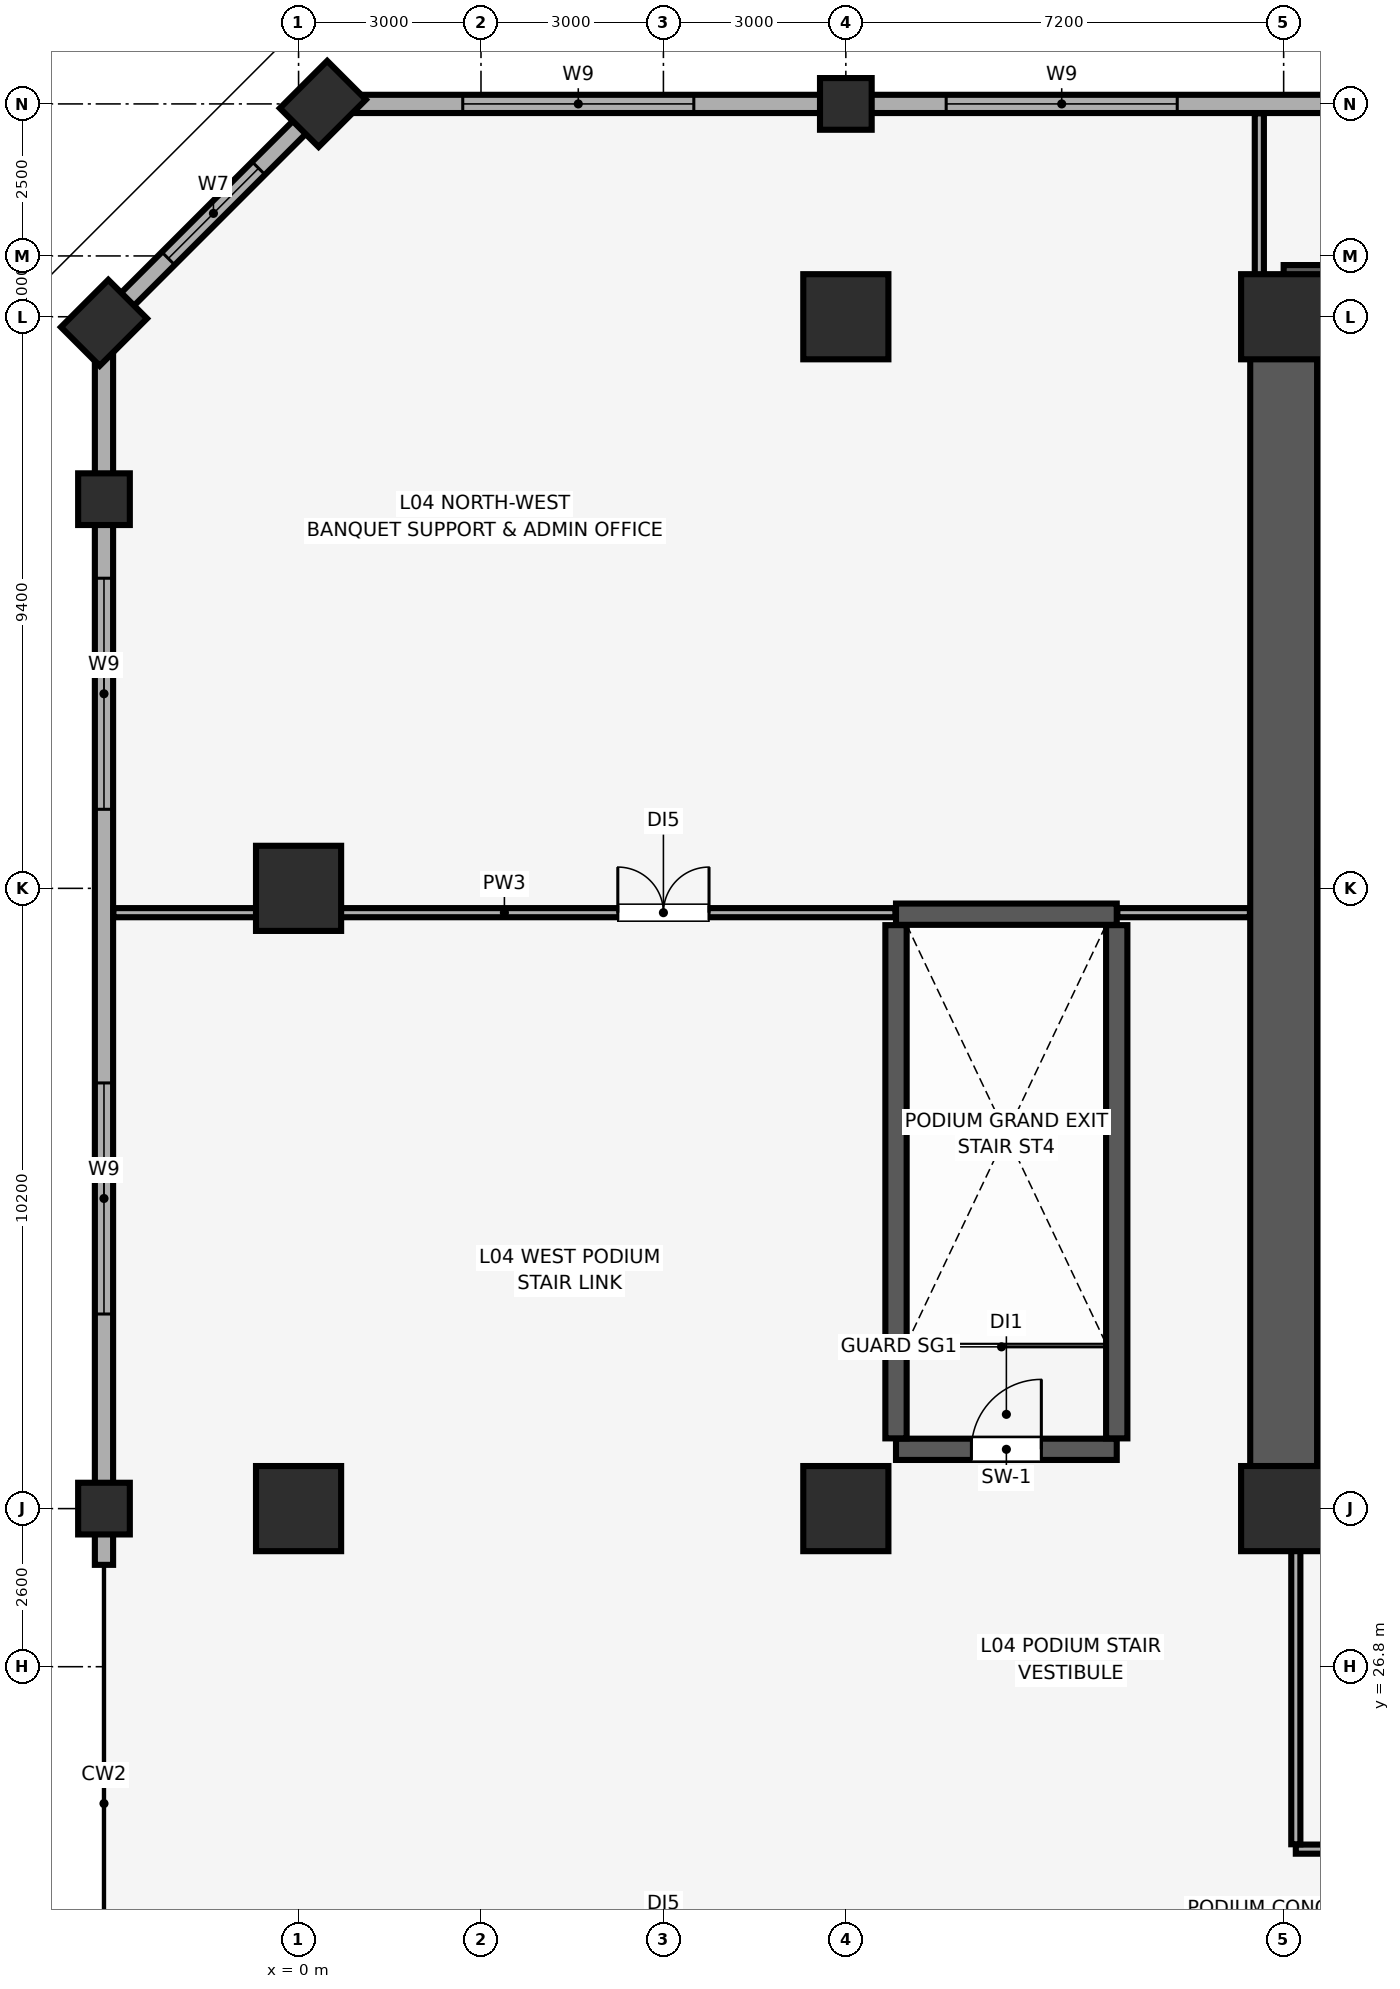
"""IFC4 building model, lengths in metres.
Left out: names, types, materials, properties, quantities, classifications, styles, units other than length and angle.
Written with IfcOpenShell. Run it as: python <this file> out.ifc"""

import sys

from ifc_helpers import new_model, si_unit, direction, frame, frame_2d, origin, origin_2d, place, context, subcontext, project, spatial, rectangle, extrude, element, fill, save


model = new_model("IFC4")
c1 = context("Model", 3, precision=1e-05, world=origin(), true_north=direction((0.0, 1.0)))
c2 = subcontext(c1, "Body", "Model", "MODEL_VIEW")
j1 = project(units=[si_unit("LENGTHUNIT", "METRE"), si_unit("PLANEANGLEUNIT", "RADIAN")], contexts=[c1])
p1 = place(None, origin())
s1 = spatial("IfcSite", under=j1, at=p1, CompositionType="ELEMENT")
p2 = place(p1, origin())
s2 = spatial("IfcBuilding", under=s1, at=p2, CompositionType="ELEMENT")
p3 = place(p2, frame((0.0, 0.0, 26.0)))
s3 = spatial("IfcBuildingStorey", under=s2, at=p3, CompositionType="ELEMENT", Elevation=26.0)
for number, where, z_axis, x_axis in (
    (1, (9.0, 52.5, 0.0), (0.0, 0.0, 1.0), (1.0, 0.0, 0.0)),
    (2, (-3.2, 29.4, 0.0), (0.0, 0.0, 1.0), (1.0, 0.0, 0.0)),
    (3, (-3.2, 46.0, 0.0), (0.0, 0.0, 1.0), (1.0, 0.0, 0.0)),
):
    element("IfcColumn", number, at=place(p3, frame(where, z_axis=z_axis, x_axis=x_axis)), inside=s3, PredefinedType="COLUMN", context=c2, shape_type="SweptSolid", body=[
        extrude(rectangle(XDim=0.85, YDim=0.85, at=origin_2d()), origin(), (0.0, 0.0, 1.0), 5.16),
    ])
for number, where, z_axis, x_axis in (
    (4, (0.4, 52.5, 0.0), (0.0, 0.0, 1.0), (0.707, 0.707, 0.0)),
    (5, (-3.2, 48.9, 0.0), (0.0, 0.0, 1.0), (0.707, 0.707, 0.0)),
):
    element("IfcColumn", number, at=place(p3, frame(where, z_axis=z_axis, x_axis=x_axis)), inside=s3, PredefinedType="PILASTER", context=c2, shape_type="SweptSolid", body=[
        extrude(rectangle(XDim=1.1, YDim=0.9, at=origin_2d()), origin(), (0.0, 0.0, 1.0), 5.16),
    ])
for number, where, z_axis, x_axis in (
    (6, (9.0, 29.4, 0.0), (0.0, 0.0, 1.0), (1.0, 0.0, 0.0)),
    (7, (9.0, 49.0, 0.0), (0.0, 0.0, 1.0), (1.0, 0.0, 0.0)),
    (8, (16.2, 29.4, 0.0), (0.0, 0.0, 1.0), (1.0, 0.0, 0.0)),
    (9, (16.2, 49.0, 0.0), (0.0, 0.0, 1.0), (1.0, 0.0, 0.0)),
    (10, (0.0, 29.4, 0.0), (0.0, 0.0, 1.0), (1.0, 0.0, 0.0)),
    (11, (0.0, 39.6, 0.0), (0.0, 0.0, 1.0), (1.0, 0.0, 0.0)),
):
    element("IfcColumn", number, at=place(p3, frame(where, z_axis=z_axis, x_axis=x_axis)), inside=s3, PredefinedType="COLUMN", context=c2, shape_type="SweptSolid", body=[
        extrude(rectangle(XDim=1.4, YDim=1.4, at=origin_2d()), origin(), (0.0, 0.0, 1.0), 5.16),
    ])
p4 = place(p3, frame((83.6, 52.5, 0.0), z_axis=(0.0, 0.0, 1.0), x_axis=(-1.0, 0.0, 0.0)))
e12 = element("IfcWall", 12, at=p4, inside=s3, PredefinedType="SOLIDWALL", context=c2, shape_type="SweptSolid", body=[
    extrude(rectangle(XDim=83.2, YDim=0.3, at=frame_2d((41.6, 0.0))), origin(), (0.0, 0.0, 1.0), 5.12),
])
p5 = place(p4, frame((77.1, 0.0, 0.85)))
e13 = element("IfcOpeningElement", 13, at=p5, cuts=e12, PredefinedType="OPENING", context=c2, shape_type="SweptSolid", body=[
    extrude(rectangle(XDim=3.8, YDim=2.2, at=frame_2d((1.9, 1.1))), frame((0.0, 0.16, 0.0), z_axis=(0.0, -1.0, 0.0), x_axis=(1.0, 0.0, 0.0)), (0.0, 0.0, 1.0), 0.32),
])
p6 = place(p4, frame((69.15, 0.0, 0.85)))
e14 = element("IfcOpeningElement", 14, at=p6, cuts=e12, PredefinedType="OPENING", context=c2, shape_type="SweptSolid", body=[
    extrude(rectangle(XDim=3.8, YDim=2.2, at=frame_2d((1.9, 1.1))), frame((0.0, 0.16, 0.0), z_axis=(0.0, -1.0, 0.0), x_axis=(1.0, 0.0, 0.0)), (0.0, 0.0, 1.0), 0.32),
])
p7 = place(p4, frame((10.1, 0.0, 0.85)))
e15 = element("IfcOpeningElement", 15, at=p7, cuts=e12, PredefinedType="OPENING", context=c2, shape_type="SweptSolid", body=[
    extrude(rectangle(XDim=3.8, YDim=2.2, at=frame_2d((1.9, 1.1))), frame((0.0, 0.16, 0.0), z_axis=(0.0, -1.0, 0.0), x_axis=(1.0, 0.0, 0.0)), (0.0, 0.0, 1.0), 0.32),
])
p8 = place(p4, frame((2.3, 0.0, 0.85)))
e16 = element("IfcOpeningElement", 16, at=p8, cuts=e12, PredefinedType="OPENING", context=c2, shape_type="SweptSolid", body=[
    extrude(rectangle(XDim=3.8, YDim=2.2, at=frame_2d((1.9, 1.1))), frame((0.0, 0.16, 0.0), z_axis=(0.0, -1.0, 0.0), x_axis=(1.0, 0.0, 0.0)), (0.0, 0.0, 1.0), 0.32),
])
p9 = place(p3, frame((0.4, 52.5, 0.0), z_axis=(0.0, 0.0, 1.0), x_axis=(-0.707082803744, -0.707130757816, 0.0)))
e17 = element("IfcWall", 17, at=p9, inside=s3, PredefinedType="SOLIDWALL", context=c2, shape_type="SweptSolid", body=[
    extrude(rectangle(XDim=5.091, YDim=0.3, at=frame_2d((2.545, 0.0))), origin(), (0.0, 0.0, 1.0), 5.12),
])
p10 = place(p9, frame((1.496, 0.0, 0.85)))
e18 = element("IfcOpeningElement", 18, at=p10, cuts=e17, PredefinedType="OPENING", context=c2, shape_type="SweptSolid", body=[
    extrude(rectangle(XDim=2.1, YDim=1.6, at=frame_2d((1.05, 0.8))), frame((0.0, 0.16, 0.0), z_axis=(0.0, -1.0, 0.0), x_axis=(1.0, 0.0, 0.0)), (0.0, 0.0, 1.0), 0.32),
])
p11 = place(p3, frame((-3.2, 48.9, 0.0), z_axis=(0.0, 0.0, 1.0), x_axis=(0.0, -1.0, 0.0)))
e19 = element("IfcWall", 19, at=p11, inside=s3, PredefinedType="SOLIDWALL", context=c2, shape_type="SweptSolid", body=[
    extrude(rectangle(XDim=20.425, YDim=0.3, at=frame_2d((10.212, 0.0))), origin(), (0.0, 0.0, 1.0), 5.12),
])
p12 = place(p11, frame((12.5, 0.0, 0.85)))
e20 = element("IfcOpeningElement", 20, at=p12, cuts=e19, PredefinedType="OPENING", context=c2, shape_type="SweptSolid", body=[
    extrude(rectangle(XDim=3.8, YDim=2.2, at=frame_2d((1.9, 1.1))), frame((0.0, 0.16, 0.0), z_axis=(0.0, -1.0, 0.0), x_axis=(1.0, 0.0, 0.0)), (0.0, 0.0, 1.0), 0.32),
])
p13 = place(p11, frame((4.2, 0.0, 0.85)))
e21 = element("IfcOpeningElement", 21, at=p13, cuts=e19, PredefinedType="OPENING", context=c2, shape_type="SweptSolid", body=[
    extrude(rectangle(XDim=3.8, YDim=2.2, at=frame_2d((1.9, 1.1))), frame((0.0, 0.16, 0.0), z_axis=(0.0, -1.0, 0.0), x_axis=(1.0, 0.0, 0.0)), (0.0, 0.0, 1.0), 0.32),
])
p14 = place(p3, frame((16.2, 49.3, 0.0), z_axis=(0.0, 0.0, 1.0), x_axis=(1.0, 0.0, 0.0)))
e22 = element("IfcWall", 22, at=p14, inside=s3, PredefinedType="SHEAR", context=c2, shape_type="SweptSolid", body=[
    extrude(rectangle(XDim=51.6, YDim=1.1, at=frame_2d((25.8, 0.0))), origin(), (0.0, 0.0, 1.0), 5.12),
])
p15 = place(p3, frame((16.2, 29.4, 0.0), z_axis=(0.0, 0.0, 1.0), x_axis=(0.0, 1.0, 0.0)))
e23 = element("IfcWall", 23, at=p15, inside=s3, PredefinedType="SHEAR", context=c2, shape_type="SweptSolid", body=[
    extrude(rectangle(XDim=19.2, YDim=1.1, at=frame_2d((9.6, 0.0))), origin(), (0.0, 0.0, 1.0), 5.12),
])
p16 = place(p3, frame((16.755, 29.4, 0.0), z_axis=(0.0, 0.0, 1.0), x_axis=(1.0, 0.0, 0.0)))
e24 = element("IfcWall", 24, at=p16, inside=s3, PredefinedType="SHEAR", context=c2, shape_type="SweptSolid", body=[
    extrude(rectangle(XDim=6.845, YDim=1.1, at=frame_2d((3.423, 0.0))), origin(), (0.0, 0.0, 1.0), 5.12),
])
p17 = place(p3, frame((16.755, 40.025, 0.0), z_axis=(0.0, 0.0, 1.0), x_axis=(1.0, 0.0, 0.0)))
e25 = element("IfcWall", 25, at=p17, inside=s3, PredefinedType="SHEAR", context=c2, shape_type="SweptSolid", body=[
    extrude(rectangle(XDim=4.1, YDim=0.35, at=frame_2d((2.05, 0.0))), origin(), (0.0, 0.0, 1.0), 5.12),
])
p18 = place(p17, frame((1.71, 0.0, 0.0)))
e26 = element("IfcOpeningElement", 26, at=p18, cuts=e25, PredefinedType="OPENING", context=c2, shape_type="SweptSolid", body=[
    extrude(rectangle(XDim=1.15, YDim=2.15, at=frame_2d((0.575, 1.075))), frame((0.0, 0.185, 0.0), z_axis=(0.0, -1.0, 0.0), x_axis=(1.0, 0.0, 0.0)), (0.0, 0.0, 1.0), 0.37),
])
p19 = place(p3, frame((9.825, 30.375, 0.0), z_axis=(0.0, 0.0, 1.0), x_axis=(1.0, 0.0, 0.0)))
e27 = element("IfcWall", 27, at=p19, inside=s3, PredefinedType="SHEAR", context=c2, shape_type="SweptSolid", body=[
    extrude(rectangle(XDim=3.63, YDim=0.35, at=frame_2d((1.815, 0.0))), origin(), (0.0, 0.0, 1.0), 5.12),
])
p20 = place(p19, frame((1.24, 0.0, 0.0)))
e28 = element("IfcOpeningElement", 28, at=p20, cuts=e27, PredefinedType="OPENING", context=c2, shape_type="SweptSolid", body=[
    extrude(rectangle(XDim=1.15, YDim=2.15, at=frame_2d((0.575, 1.075))), frame((0.0, 0.185, 0.0), z_axis=(0.0, -1.0, 0.0), x_axis=(1.0, 0.0, 0.0)), (0.0, 0.0, 1.0), 0.37),
])
p21 = place(p3, frame((9.825, 39.175, 0.0), z_axis=(0.0, 0.0, 1.0), x_axis=(1.0, 0.0, 0.0)))
e29 = element("IfcWall", 29, at=p21, inside=s3, PredefinedType="SHEAR", context=c2, shape_type="SweptSolid", body=[
    extrude(rectangle(XDim=3.63, YDim=0.35, at=frame_2d((1.815, 0.0))), origin(), (0.0, 0.0, 1.0), 5.12),
])
for number, where, z_axis, x_axis in (
    (30, (9.825, 30.555, 0.0), (0.0, 0.0, 1.0), (0.0, 1.0, 0.0)),
    (31, (13.455, 30.555, 0.0), (0.0, 0.0, 1.0), (0.0, 1.0, 0.0)),
):
    element("IfcWall", number, at=place(p3, frame(where, z_axis=z_axis, x_axis=x_axis)), inside=s3, PredefinedType="SHEAR", context=c2, shape_type="SweptSolid", body=[
        extrude(rectangle(XDim=8.44, YDim=0.35, at=frame_2d((4.22, 0.0))), origin(), (0.0, 0.0, 1.0), 5.12),
    ])
p22 = place(p3, frame((-3.045, 39.2, 0.0), z_axis=(0.0, 0.0, 1.0), x_axis=(1.0, 0.0, 0.0)))
e32 = element("IfcWall", 32, at=p22, inside=s3, PredefinedType="PARTITIONING", context=c2, shape_type="SweptSolid", body=[
    extrude(rectangle(XDim=12.86, YDim=0.15, at=frame_2d((6.43, 0.0))), origin(), (0.0, 0.0, 1.0), 5.12),
])
p23 = place(p22, frame((8.295, 0.0, 0.0)))
e33 = element("IfcOpeningElement", 33, at=p23, cuts=e32, PredefinedType="OPENING", context=c2, shape_type="SweptSolid", body=[
    extrude(rectangle(XDim=1.5, YDim=2.25, at=frame_2d((0.75, 1.125))), frame((0.0, 0.085, 0.0), z_axis=(0.0, -1.0, 0.0), x_axis=(1.0, 0.0, 0.0)), (0.0, 0.0, 1.0), 0.17),
])
p24 = place(p3, frame((13.465, 39.2, 0.0), z_axis=(0.0, 0.0, 1.0), x_axis=(1.0, 0.0, 0.0)))
e34 = element("IfcWall", 34, at=p24, inside=s3, PredefinedType="PARTITIONING", context=c2, shape_type="SweptSolid", body=[
    extrude(rectangle(XDim=2.18, YDim=0.15, at=frame_2d((1.09, 0.0))), origin(), (0.0, 0.0, 1.0), 5.12),
])
p25 = place(p3, frame((15.8, 48.61, 0.0), z_axis=(0.0, 0.0, 1.0), x_axis=(0.0, 1.0, 0.0)))
e35 = element("IfcWall", 35, at=p25, inside=s3, PredefinedType="PARTITIONING", context=c2, shape_type="SweptSolid", body=[
    extrude(rectangle(XDim=3.735, YDim=0.15, at=frame_2d((1.867, 0.0))), origin(), (0.0, 0.0, 1.0), 5.12),
])
p26 = place(p3, frame((16.4, 23.8, 0.0), z_axis=(0.0, 0.0, 1.0), x_axis=(1.0, 0.0, 0.0)))
e36 = element("IfcWall", 36, at=p26, inside=s3, PredefinedType="PARTITIONING", context=c2, shape_type="SweptSolid", body=[
    extrude(rectangle(XDim=23.6, YDim=0.15, at=frame_2d((11.8, 0.0))), origin(), (0.0, 0.0, 1.0), 5.12),
])
p27 = place(p26, frame((10.1, 0.0, 0.0)))
e37 = element("IfcOpeningElement", 37, at=p27, cuts=e36, PredefinedType="OPENING", context=c2, shape_type="SweptSolid", body=[
    extrude(rectangle(XDim=1.0, YDim=2.15, at=frame_2d((0.5, 1.075))), frame((0.0, 0.085, 0.0), z_axis=(0.0, -1.0, 0.0), x_axis=(1.0, 0.0, 0.0)), (0.0, 0.0, 1.0), 0.17),
])
p28 = place(p3, frame((16.4, 23.88, 0.0), z_axis=(0.0, 0.0, 1.0), x_axis=(0.0, 1.0, 0.0)))
e38 = element("IfcWall", 38, at=p28, inside=s3, PredefinedType="PARTITIONING", context=c2, shape_type="SweptSolid", body=[
    extrude(rectangle(XDim=5.51, YDim=0.15, at=frame_2d((2.755, 0.0))), origin(), (0.0, 0.0, 1.0), 4.627),
])
p29 = place(p10, origin())
e39 = element("IfcWindow", 39, at=p29, inside=s3, PartitioningType="SINGLE_PANEL", PredefinedType="WINDOW", context=c2, shape_type="SweptSolid", body=[
    extrude(rectangle(XDim=2.1, YDim=1.6, at=frame_2d((1.05, 0.8))), frame((0.0, 0.03, 0.0), z_axis=(0.0, -1.0, 0.0), x_axis=(1.0, 0.0, 0.0)), (0.0, 0.0, 1.0), 0.06),
])
fill(e18, e39)
p30 = place(p12, origin())
e40 = element("IfcWindow", 40, at=p30, inside=s3, PartitioningType="SINGLE_PANEL", PredefinedType="WINDOW", context=c2, shape_type="SweptSolid", body=[
    extrude(rectangle(XDim=3.8, YDim=2.2, at=frame_2d((1.9, 1.1))), frame((0.0, 0.03, 0.0), z_axis=(0.0, -1.0, 0.0), x_axis=(1.0, 0.0, 0.0)), (0.0, 0.0, 1.0), 0.06),
])
fill(e20, e40)
p31 = place(p13, origin())
e41 = element("IfcWindow", 41, at=p31, inside=s3, PartitioningType="SINGLE_PANEL", PredefinedType="WINDOW", context=c2, shape_type="SweptSolid", body=[
    extrude(rectangle(XDim=3.8, YDim=2.2, at=frame_2d((1.9, 1.1))), frame((0.0, 0.03, 0.0), z_axis=(0.0, -1.0, 0.0), x_axis=(1.0, 0.0, 0.0)), (0.0, 0.0, 1.0), 0.06),
])
fill(e21, e41)
p32 = place(p5, origin())
e42 = element("IfcWindow", 42, at=p32, inside=s3, PartitioningType="SINGLE_PANEL", PredefinedType="WINDOW", context=c2, shape_type="SweptSolid", body=[
    extrude(rectangle(XDim=3.8, YDim=2.2, at=frame_2d((1.9, 1.1))), frame((0.0, 0.03, 0.0), z_axis=(0.0, -1.0, 0.0), x_axis=(1.0, 0.0, 0.0)), (0.0, 0.0, 1.0), 0.06),
])
fill(e13, e42)
p33 = place(p6, origin())
e43 = element("IfcWindow", 43, at=p33, inside=s3, PartitioningType="SINGLE_PANEL", PredefinedType="WINDOW", context=c2, shape_type="SweptSolid", body=[
    extrude(rectangle(XDim=3.8, YDim=2.2, at=frame_2d((1.9, 1.1))), frame((0.0, 0.03, 0.0), z_axis=(0.0, -1.0, 0.0), x_axis=(1.0, 0.0, 0.0)), (0.0, 0.0, 1.0), 0.06),
])
fill(e14, e43)
p34 = place(p20, origin())
e44 = element("IfcDoor", 44, at=p34, inside=s3, OperationType="SINGLE_SWING_RIGHT", PredefinedType="DOOR", context=c2, shape_type="SweptSolid", body=[
    extrude(rectangle(XDim=1.15, YDim=2.15, at=frame_2d((0.575, 1.075))), frame((0.0, 0.025, 0.0), z_axis=(0.0, -1.0, 0.0), x_axis=(1.0, 0.0, 0.0)), (0.0, 0.0, 1.0), 0.05),
])
fill(e28, e44)
p35 = place(p23, origin())
e45 = element("IfcDoor", 45, at=p35, inside=s3, OperationType="DOUBLE_DOOR_SINGLE_SWING", PredefinedType="DOOR", context=c2, shape_type="SweptSolid", body=[
    extrude(rectangle(XDim=1.5, YDim=2.25, at=frame_2d((0.75, 1.125))), frame((0.0, 0.025, 0.0), z_axis=(0.0, -1.0, 0.0), x_axis=(1.0, 0.0, 0.0)), (0.0, 0.0, 1.0), 0.05),
])
fill(e33, e45)
save(model, sys.argv[1])
